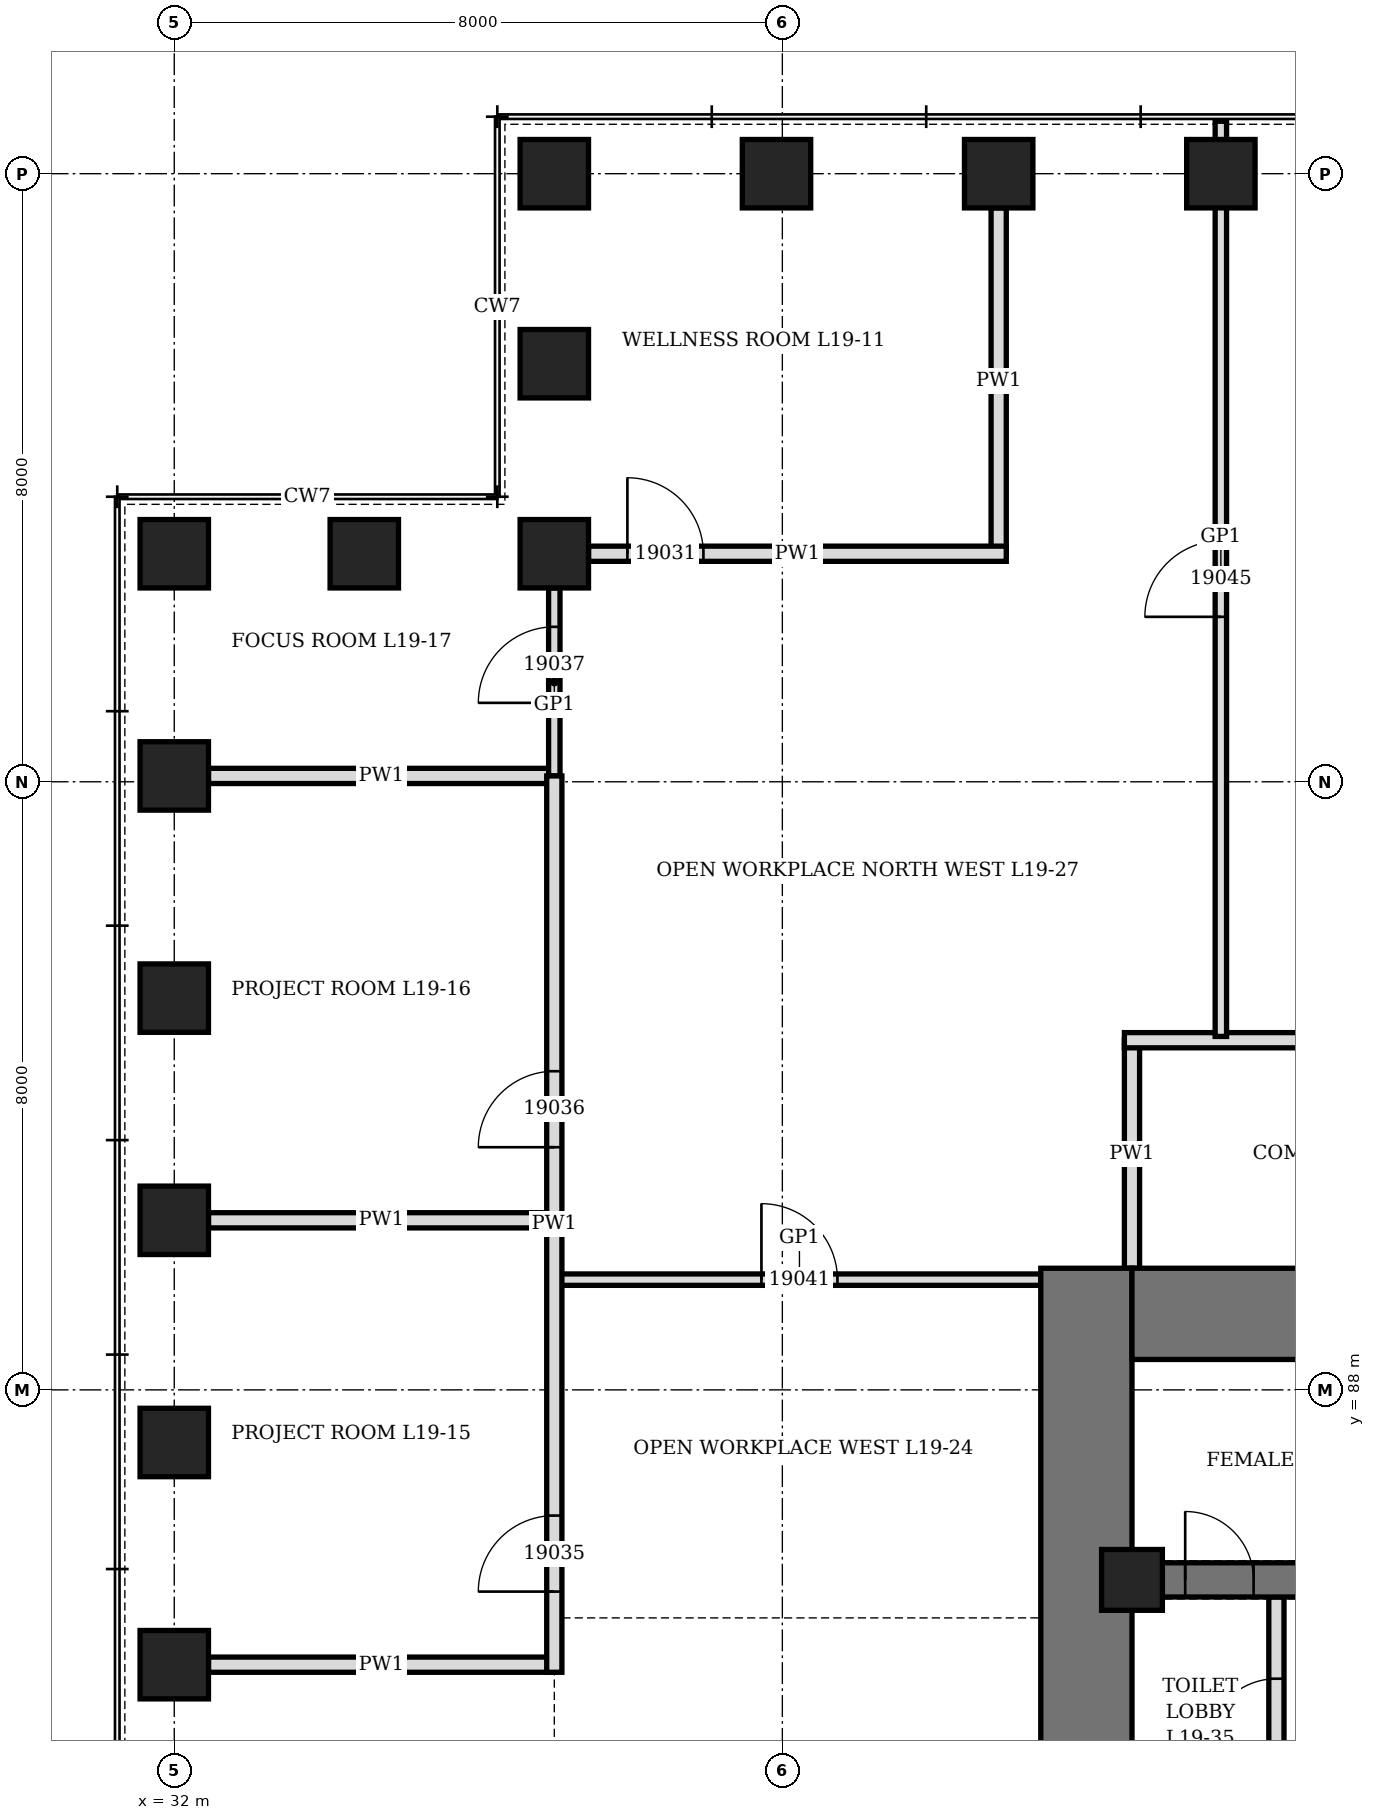
"""IFC4 building model, lengths in metres.
Left out: names, types, materials, properties, quantities, classifications, styles, units other than length and angle.
Written with IfcOpenShell. Run it as: python <this file> out.ifc"""

import sys

from ifc_helpers import new_model, si_unit, direction, frame, frame_2d, origin, origin_2d, place, context, subcontext, project, spatial, rectangle, hollow_rectangle, extrude, element, fill, save


model = new_model("IFC4")
c1 = context("Model", 3, precision=1e-05, world=origin(), true_north=direction((0.0, 1.0)))
c2 = subcontext(c1, "Body", "Model", "MODEL_VIEW")
j1 = project(units=[si_unit("LENGTHUNIT", "METRE"), si_unit("PLANEANGLEUNIT", "RADIAN")], contexts=[c1])
p1 = place(None, origin())
s1 = spatial("IfcSite", under=j1, at=p1, CompositionType="ELEMENT")
p2 = place(p1, origin())
s2 = spatial("IfcBuilding", under=s1, at=p2, CompositionType="ELEMENT")
p3 = place(p2, frame((0.0, 0.0, 89.5)))
s3 = spatial("IfcBuildingStorey", under=s2, at=p3, CompositionType="ELEMENT", Elevation=89.5)
for number, where, z_axis, x_axis in (
    (1, (45.769, 104.0, 0.0), (0.0, 0.0, 1.0), (1.0, 0.0, 0.0)),
    (2, (42.846, 104.0, 0.0), (0.0, 0.0, 1.0), (1.0, 0.0, 0.0)),
    (3, (39.923, 104.0, 0.0), (0.0, 0.0, 1.0), (1.0, 0.0, 0.0)),
    (4, (37.0, 104.0, 0.0), (0.0, 0.0, 1.0), (0.0, 1.0, 0.0)),
    (5, (37.0, 101.5, 0.0), (0.0, 0.0, 1.0), (0.0, 1.0, 0.0)),
    (6, (37.0, 99.0, 0.0), (0.0, 0.0, 1.0), (1.0, 0.0, 0.0)),
    (7, (34.5, 99.0, 0.0), (0.0, 0.0, 1.0), (1.0, 0.0, 0.0)),
    (8, (32.0, 99.0, 0.0), (0.0, 0.0, 1.0), (0.0, 1.0, 0.0)),
    (9, (32.0, 96.077, 0.0), (0.0, 0.0, 1.0), (0.0, 1.0, 0.0)),
    (10, (32.0, 93.154, 0.0), (0.0, 0.0, 1.0), (0.0, 1.0, 0.0)),
    (11, (32.0, 90.231, 0.0), (0.0, 0.0, 1.0), (0.0, 1.0, 0.0)),
    (12, (32.0, 87.308, 0.0), (0.0, 0.0, 1.0), (0.0, 1.0, 0.0)),
    (13, (32.0, 84.385, 0.0), (0.0, 0.0, 1.0), (0.0, 1.0, 0.0)),
):
    element("IfcColumn", number, at=place(p3, frame(where, z_axis=z_axis, x_axis=x_axis)), inside=s3, PredefinedType="COLUMN", context=c2, shape_type="SweptSolid", body=[
        extrude(hollow_rectangle(XDim=0.9, YDim=0.9, WallThickness=0.12, at=origin_2d()), origin(), (0.0, 0.0, 1.0), 4.2),
    ])
p4 = place(p3, frame((44.0, 70.4, 0.0), z_axis=(0.0, 0.0, 1.0), x_axis=(0.0, 1.0, 0.0)))
e14 = element("IfcWall", 14, at=p4, inside=s3, PredefinedType="SHEAR", context=c2, shape_type="SweptSolid", body=[
    extrude(rectangle(XDim=19.2, YDim=1.2, at=frame_2d((9.6, 0.0))), origin(), (0.0, 0.0, 1.0), 4.2),
])
p5 = place(p4, frame((8.6, 0.0, 0.0)))
e15 = element("IfcOpeningElement", 15, at=p5, cuts=e14, PredefinedType="OPENING", context=c2, shape_type="SweptSolid", body=[
    extrude(rectangle(XDim=2.0, YDim=2.4, at=frame_2d((1.0, 1.2))), frame((0.0, 0.61, 0.0), z_axis=(0.0, -1.0, 0.0), x_axis=(1.0, 0.0, 0.0)), (0.0, 0.0, 1.0), 1.22),
])
p6 = place(p3, frame((44.6, 89.0, 0.0), z_axis=(0.0, 0.0, 1.0), x_axis=(1.0, 0.0, 0.0)))
e16 = element("IfcWall", 16, at=p6, inside=s3, PredefinedType="SHEAR", context=c2, shape_type="SweptSolid", body=[
    extrude(rectangle(XDim=22.8, YDim=1.2, at=frame_2d((11.4, 0.0))), origin(), (0.0, 0.0, 1.0), 4.2),
])
p7 = place(p6, frame((6.325, 0.0, 0.0)))
e17 = element("IfcOpeningElement", 17, at=p7, cuts=e16, PredefinedType="OPENING", context=c2, shape_type="SweptSolid", body=[
    extrude(rectangle(XDim=1.0, YDim=2.1, at=frame_2d((0.5, 1.05))), frame((0.0, 0.61, 0.0), z_axis=(0.0, -1.0, 0.0), x_axis=(1.0, 0.0, 0.0)), (0.0, 0.0, 1.0), 1.22),
])
p8 = place(p6, frame((9.25, 0.0, 0.0)))
e18 = element("IfcOpeningElement", 18, at=p8, cuts=e16, PredefinedType="OPENING", context=c2, shape_type="SweptSolid", body=[
    extrude(rectangle(XDim=0.9, YDim=2.1, at=frame_2d((0.45, 1.05))), frame((0.0, 0.61, 0.0), z_axis=(0.0, -1.0, 0.0), x_axis=(1.0, 0.0, 0.0)), (0.0, 0.0, 1.0), 1.22),
])
p9 = place(p6, frame((13.012, 0.0, 0.0)))
e19 = element("IfcOpeningElement", 19, at=p9, cuts=e16, PredefinedType="OPENING", context=c2, shape_type="SweptSolid", body=[
    extrude(rectangle(XDim=0.9, YDim=2.1, at=frame_2d((0.45, 1.05))), frame((0.0, 0.61, 0.0), z_axis=(0.0, -1.0, 0.0), x_axis=(1.0, 0.0, 0.0)), (0.0, 0.0, 1.0), 1.22),
])
p10 = place(p3, frame((44.6, 85.5, 0.0), z_axis=(0.0, 0.0, 1.0), x_axis=(1.0, 0.0, 0.0)))
e20 = element("IfcWall", 20, at=p10, inside=s3, PredefinedType="SHEAR", context=c2, shape_type="SweptSolid", body=[
    extrude(rectangle(XDim=5.175, YDim=0.45, at=frame_2d((2.587, 0.0))), origin(), (0.0, 0.0, 1.0), 4.2),
])
p11 = place(p10, frame((0.7, 0.0, 0.0)))
e21 = element("IfcOpeningElement", 21, at=p11, cuts=e20, PredefinedType="OPENING", context=c2, shape_type="SweptSolid", body=[
    extrude(rectangle(XDim=0.9, YDim=2.1, at=frame_2d((0.45, 1.05))), frame((0.0, 0.235, 0.0), z_axis=(0.0, -1.0, 0.0), x_axis=(1.0, 0.0, 0.0)), (0.0, 0.0, 1.0), 0.47),
])
p12 = place(p3, frame((44.6, 85.5, 0.0), z_axis=(0.0, 0.0, 1.0), x_axis=(1.0, 0.0, 0.0)))
e22 = element("IfcColumn", 22, at=p12, inside=s3, PredefinedType="COLUMN", context=c2, shape_type="SweptSolid", body=[
    extrude(hollow_rectangle(XDim=0.8, YDim=0.8, WallThickness=0.1, at=origin_2d()), origin(), (0.0, 0.0, 1.0), 4.2),
])
p13 = place(p3, frame((46.5, 82.225, 0.0), z_axis=(0.0, 0.0, 1.0), x_axis=(0.0, 1.0, 0.0)))
e23 = element("IfcWall", 23, at=p13, inside=s3, PredefinedType="PARTITIONING", context=c2, shape_type="SweptSolid", body=[
    extrude(rectangle(XDim=3.05, YDim=0.2, at=frame_2d((1.525, 0.0))), origin(), (0.0, 0.0, 1.0), 4.04),
])
p14 = place(p13, frame((1.075, 0.0, 0.0)))
e24 = element("IfcOpeningElement", 24, at=p14, cuts=e23, PredefinedType="OPENING", context=c2, shape_type="SweptSolid", body=[
    extrude(rectangle(XDim=0.9, YDim=2.1, at=frame_2d((0.45, 1.05))), frame((0.0, 0.11, 0.0), z_axis=(0.0, -1.0, 0.0), x_axis=(1.0, 0.0, 0.0)), (0.0, 0.0, 1.0), 0.22),
])
p15 = place(p3, frame((42.846, 99.0, 0.0), z_axis=(0.0, 0.0, 1.0), x_axis=(0.0, 1.0, 0.0)))
e25 = element("IfcWall", 25, at=p15, inside=s3, PredefinedType="PARTITIONING", context=c2, shape_type="SweptSolid", body=[
    extrude(rectangle(XDim=4.55, YDim=0.2, at=frame_2d((2.275, 0.0))), origin(), (0.0, 0.0, 1.0), 3.278),
])
for number, where, z_axis, x_axis in (
    (26, (32.45, 84.385, 0.0), (0.0, 0.0, 1.0), (1.0, 0.0, 0.0)),
    (27, (32.45, 90.231, 0.0), (0.0, 0.0, 1.0), (1.0, 0.0, 0.0)),
    (28, (32.45, 96.077, 0.0), (0.0, 0.0, 1.0), (1.0, 0.0, 0.0)),
):
    element("IfcWall", number, at=place(p3, frame(where, z_axis=z_axis, x_axis=x_axis)), inside=s3, PredefinedType="PARTITIONING", context=c2, shape_type="SweptSolid", body=[
        extrude(rectangle(XDim=4.55, YDim=0.2, at=frame_2d((2.275, 0.0))), origin(), (0.0, 0.0, 1.0), 3.428),
    ])
p16 = place(p3, frame((44.6, 89.6, 0.0), z_axis=(0.0, 0.0, 1.0), x_axis=(0.0, 1.0, 0.0)))
e29 = element("IfcWall", 29, at=p16, inside=s3, PredefinedType="PARTITIONING", context=c2, shape_type="SweptSolid", body=[
    extrude(rectangle(XDim=3.0, YDim=0.2, at=frame_2d((1.5, 0.0))), origin(), (0.0, 0.0, 1.0), 4.04),
])
p17 = place(p3, frame((37.05, 89.45, 0.0), z_axis=(0.0, 0.0, 1.0), x_axis=(1.0, 0.0, 0.0)))
e30 = element("IfcWall", 30, at=p17, inside=s3, PredefinedType="PARTITIONING", context=c2, shape_type="SweptSolid", body=[
    extrude(rectangle(XDim=6.35, YDim=0.15, at=frame_2d((3.175, 0.0))), origin(), (0.0, 0.0, 1.0), 4.04),
])
p18 = place(p17, frame((2.675, 0.0, 0.0)))
e31 = element("IfcOpeningElement", 31, at=p18, cuts=e30, PredefinedType="OPENING", context=c2, shape_type="SweptSolid", body=[
    extrude(rectangle(XDim=1.0, YDim=2.4, at=frame_2d((0.5, 1.2))), frame((0.0, 0.085, 0.0), z_axis=(0.0, -1.0, 0.0), x_axis=(1.0, 0.0, 0.0)), (0.0, 0.0, 1.0), 0.17),
])
p19 = place(p3, frame((44.5, 92.6, 0.0), z_axis=(0.0, 0.0, 1.0), x_axis=(1.0, 0.0, 0.0)))
e32 = element("IfcWall", 32, at=p19, inside=s3, PredefinedType="PARTITIONING", context=c2, shape_type="SweptSolid", body=[
    extrude(rectangle(XDim=6.4, YDim=0.2, at=frame_2d((3.2, 0.0))), origin(), (0.0, 0.0, 1.0), 4.04),
])
p20 = place(p19, frame((2.7, 0.0, 0.0)))
e33 = element("IfcOpeningElement", 33, at=p20, cuts=e32, PredefinedType="OPENING", context=c2, shape_type="SweptSolid", body=[
    extrude(rectangle(XDim=1.0, YDim=2.1, at=frame_2d((0.5, 1.05))), frame((0.0, 0.11, 0.0), z_axis=(0.0, -1.0, 0.0), x_axis=(1.0, 0.0, 0.0)), (0.0, 0.0, 1.0), 0.22),
])
p21 = place(p3, frame((37.45, 99.0, 0.0), z_axis=(0.0, 0.0, 1.0), x_axis=(1.0, 0.0, 0.0)))
e34 = element("IfcWall", 34, at=p21, inside=s3, PredefinedType="PARTITIONING", context=c2, shape_type="SweptSolid", body=[
    extrude(rectangle(XDim=5.496, YDim=0.2, at=frame_2d((2.748, 0.0))), origin(), (0.0, 0.0, 1.0), 4.04),
])
p22 = place(p21, frame((0.511, 0.0, 0.0)))
e35 = element("IfcOpeningElement", 35, at=p22, cuts=e34, PredefinedType="OPENING", context=c2, shape_type="SweptSolid", body=[
    extrude(rectangle(XDim=1.0, YDim=2.1, at=frame_2d((0.5, 1.05))), frame((0.0, 0.11, 0.0), z_axis=(0.0, -1.0, 0.0), x_axis=(1.0, 0.0, 0.0)), (0.0, 0.0, 1.0), 0.22),
])
p23 = place(p3, frame((37.0, 96.077, 0.0), z_axis=(0.0, 0.0, 1.0), x_axis=(0.0, 1.0, 0.0)))
e36 = element("IfcWall", 36, at=p23, inside=s3, PredefinedType="PARTITIONING", context=c2, shape_type="SweptSolid", body=[
    extrude(rectangle(XDim=2.473, YDim=0.15, at=frame_2d((1.237, 0.0))), origin(), (0.0, 0.0, 1.0), 4.04),
])
p24 = place(p23, frame((0.961, 0.0, 0.0)))
e37 = element("IfcOpeningElement", 37, at=p24, cuts=e36, PredefinedType="OPENING", context=c2, shape_type="SweptSolid", body=[
    extrude(rectangle(XDim=1.0, YDim=2.4, at=frame_2d((0.5, 1.2))), frame((0.0, 0.085, 0.0), z_axis=(0.0, -1.0, 0.0), x_axis=(1.0, 0.0, 0.0)), (0.0, 0.0, 1.0), 0.17),
])
p25 = place(p3, frame((37.0, 84.285, 0.0), z_axis=(0.0, 0.0, 1.0), x_axis=(0.0, 1.0, 0.0)))
e38 = element("IfcWall", 38, at=p25, inside=s3, PredefinedType="PARTITIONING", context=c2, shape_type="SweptSolid", body=[
    extrude(rectangle(XDim=11.792, YDim=0.2, at=frame_2d((5.896, 0.0))), origin(), (0.0, 0.0, 1.0), 4.04),
])
p26 = place(p25, frame((1.062, 0.0, 0.0)))
e39 = element("IfcOpeningElement", 39, at=p26, cuts=e38, PredefinedType="OPENING", context=c2, shape_type="SweptSolid", body=[
    extrude(rectangle(XDim=1.0, YDim=2.1, at=frame_2d((0.5, 1.05))), frame((0.0, 0.11, 0.0), z_axis=(0.0, -1.0, 0.0), x_axis=(1.0, 0.0, 0.0)), (0.0, 0.0, 1.0), 0.22),
])
p27 = place(p25, frame((6.908, 0.0, 0.0)))
e40 = element("IfcOpeningElement", 40, at=p27, cuts=e38, PredefinedType="OPENING", context=c2, shape_type="SweptSolid", body=[
    extrude(rectangle(XDim=1.0, YDim=2.1, at=frame_2d((0.5, 1.05))), frame((0.0, 0.11, 0.0), z_axis=(0.0, -1.0, 0.0), x_axis=(1.0, 0.0, 0.0)), (0.0, 0.0, 1.0), 0.22),
])
p28 = place(p3, frame((45.769, 92.65, 0.0), z_axis=(0.0, 0.0, 1.0), x_axis=(0.0, 1.0, 0.0)))
e41 = element("IfcWall", 41, at=p28, inside=s3, PredefinedType="PARTITIONING", context=c2, shape_type="SweptSolid", body=[
    extrude(rectangle(XDim=12.04, YDim=0.15, at=frame_2d((6.02, 0.0))), origin(), (0.0, 0.0, 1.0), 3.278),
])
p29 = place(p28, frame((5.52, 0.0, 0.0)))
e42 = element("IfcOpeningElement", 42, at=p29, cuts=e41, PredefinedType="OPENING", context=c2, shape_type="SweptSolid", body=[
    extrude(rectangle(XDim=1.0, YDim=2.4, at=frame_2d((0.5, 1.2))), frame((0.0, 0.085, 0.0), z_axis=(0.0, -1.0, 0.0), x_axis=(1.0, 0.0, 0.0)), (0.0, 0.0, 1.0), 0.17),
])
p30 = place(p14, origin())
e43 = element("IfcDoor", 43, at=p30, inside=s3, OperationType="SINGLE_SWING_RIGHT", PredefinedType="DOOR", context=c2, shape_type="SweptSolid", body=[
    extrude(rectangle(XDim=0.9, YDim=2.1, at=frame_2d((0.45, 1.05))), frame((0.0, 0.1, 0.0), z_axis=(0.0, -1.0, 0.0), x_axis=(1.0, 0.0, 0.0)), (0.0, 0.0, 1.0), 0.199),
])
fill(e24, e43)
p31 = place(p11, origin())
e44 = element("IfcDoor", 44, at=p31, inside=s3, OperationType="SINGLE_SWING_RIGHT", PredefinedType="DOOR", context=c2, shape_type="SweptSolid", body=[
    extrude(rectangle(XDim=0.9, YDim=2.1, at=frame_2d((0.45, 1.05))), frame((0.0, 0.225, 0.0), z_axis=(0.0, -1.0, 0.0), x_axis=(1.0, 0.0, 0.0)), (0.0, 0.0, 1.0), 0.449),
])
fill(e21, e44)
p32 = place(p22, origin())
e45 = element("IfcDoor", 45, at=p32, inside=s3, OperationType="SINGLE_SWING_LEFT", PredefinedType="DOOR", context=c2, shape_type="SweptSolid", body=[
    extrude(rectangle(XDim=1.0, YDim=2.1, at=frame_2d((0.5, 1.05))), frame((0.0, 0.1, 0.0), z_axis=(0.0, -1.0, 0.0), x_axis=(1.0, 0.0, 0.0)), (0.0, 0.0, 1.0), 0.199),
])
fill(e35, e45)
p33 = place(p26, origin())
e46 = element("IfcDoor", 46, at=p33, inside=s3, OperationType="SINGLE_SWING_LEFT", PredefinedType="DOOR", context=c2, shape_type="SweptSolid", body=[
    extrude(rectangle(XDim=1.0, YDim=2.1, at=frame_2d((0.5, 1.05))), frame((0.0, 0.1, 0.0), z_axis=(0.0, -1.0, 0.0), x_axis=(1.0, 0.0, 0.0)), (0.0, 0.0, 1.0), 0.199),
])
fill(e39, e46)
p34 = place(p27, origin())
e47 = element("IfcDoor", 47, at=p34, inside=s3, OperationType="SINGLE_SWING_LEFT", PredefinedType="DOOR", context=c2, shape_type="SweptSolid", body=[
    extrude(rectangle(XDim=1.0, YDim=2.1, at=frame_2d((0.5, 1.05))), frame((0.0, 0.1, 0.0), z_axis=(0.0, -1.0, 0.0), x_axis=(1.0, 0.0, 0.0)), (0.0, 0.0, 1.0), 0.199),
])
fill(e40, e47)
p35 = place(p24, origin())
e48 = element("IfcDoor", 48, at=p35, inside=s3, OperationType="SINGLE_SWING_RIGHT", PredefinedType="DOOR", context=c2, shape_type="SweptSolid", body=[
    extrude(rectangle(XDim=1.0, YDim=2.4, at=frame_2d((0.5, 1.2))), frame((0.0, 0.075, 0.0), z_axis=(0.0, -1.0, 0.0), x_axis=(1.0, 0.0, 0.0)), (0.0, 0.0, 1.0), 0.149),
])
fill(e37, e48)
p36 = place(p18, origin())
e49 = element("IfcDoor", 49, at=p36, inside=s3, OperationType="SINGLE_SWING_RIGHT", PredefinedType="DOOR", context=c2, shape_type="SweptSolid", body=[
    extrude(rectangle(XDim=1.0, YDim=2.4, at=frame_2d((0.5, 1.2))), frame((0.0, 0.075, 0.0), z_axis=(0.0, -1.0, 0.0), x_axis=(1.0, 0.0, 0.0)), (0.0, 0.0, 1.0), 0.149),
])
fill(e31, e49)
p37 = place(p29, origin())
e50 = element("IfcDoor", 50, at=p37, inside=s3, OperationType="SINGLE_SWING_RIGHT", PredefinedType="DOOR", context=c2, shape_type="SweptSolid", body=[
    extrude(rectangle(XDim=1.0, YDim=2.4, at=frame_2d((0.5, 1.2))), frame((0.0, 0.075, 0.0), z_axis=(0.0, -1.0, 0.0), x_axis=(1.0, 0.0, 0.0)), (0.0, 0.0, 1.0), 0.149),
])
fill(e42, e50)
save(model, sys.argv[1])
